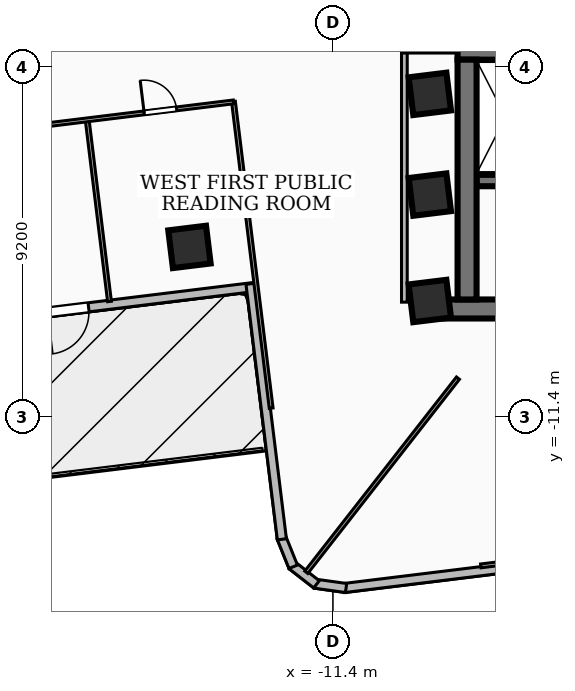
"""IFC4 building model, lengths in metres.
Left out: names, types, materials, properties, quantities, classifications, styles, units other than length and angle.
Written with IfcOpenShell. Run it as: python <this file> out.ifc"""

import sys

from ifc_helpers import new_model, si_unit, direction, frame, frame_2d, origin, origin_2d, place, context, subcontext, project, spatial, rectangle, extrude, element, fill, save


model = new_model("IFC4")
c1 = context("Model", 3, precision=1e-05, world=origin(), true_north=direction((0.0, 1.0)))
c2 = subcontext(c1, "Body", "Model", "MODEL_VIEW")
j1 = project(units=[si_unit("LENGTHUNIT", "METRE"), si_unit("PLANEANGLEUNIT", "RADIAN")], contexts=[c1])
p1 = place(None, origin())
s1 = spatial("IfcSite", under=j1, at=p1, CompositionType="ELEMENT")
p2 = place(p1, origin())
s2 = spatial("IfcBuilding", under=s1, at=p2, CompositionType="ELEMENT")
p3 = place(p2, frame((0.0, 0.0, 78.48)))
s3 = spatial("IfcBuildingStorey", under=s2, at=p3, CompositionType="ELEMENT", Elevation=78.48)
p4 = place(p3, frame((8.78, -8.56, 0.0), z_axis=(0.0, 0.0, 1.0), x_axis=(-1.0, 0.0, 0.0)))
e1 = element("IfcWall", 1, at=p4, inside=s3, PredefinedType="SHEAR", context=c2, shape_type="SweptSolid", body=[
    extrude(rectangle(XDim=17.56, YDim=0.5, at=frame_2d((8.78, 0.0))), origin(), (0.0, 0.0, 1.0), 3.34),
])
p5 = place(p3, frame((-8.12, -1.75, 0.0), z_axis=(0.0, 0.0, 1.0), x_axis=(1.0, 0.0, 0.0)))
e2 = element("IfcWall", 2, at=p5, inside=s3, PredefinedType="SHEAR", context=c2, shape_type="SweptSolid", body=[
    extrude(rectangle(XDim=16.24, YDim=0.5, at=frame_2d((8.12, 0.0))), origin(), (0.0, 0.0, 1.0), 3.34),
])
p6 = place(p5, frame((7.45, 0.0, 0.0)))
e3 = element("IfcOpeningElement", 3, at=p6, cuts=e2, PredefinedType="OPENING", context=c2, shape_type="SweptSolid", body=[
    extrude(rectangle(XDim=1.0, YDim=2.1, at=frame_2d((0.5, 1.05))), frame((0.0, 0.26, 0.0), z_axis=(0.0, -1.0, 0.0), x_axis=(1.0, 0.0, 0.0)), (0.0, 0.0, 1.0), 0.52),
])
p7 = place(p5, frame((10.965, 0.0, 0.0)))
e4 = element("IfcOpeningElement", 4, at=p7, cuts=e2, PredefinedType="OPENING", context=c2, shape_type="SweptSolid", body=[
    extrude(rectangle(XDim=1.05, YDim=2.15, at=frame_2d((0.525, 1.075))), frame((0.0, 0.26, 0.0), z_axis=(0.0, -1.0, 0.0), x_axis=(1.0, 0.0, 0.0)), (0.0, 0.0, 1.0), 0.52),
])
p8 = place(p5, frame((12.525, 0.0, 0.0)))
e5 = element("IfcOpeningElement", 5, at=p8, cuts=e2, PredefinedType="OPENING", context=c2, shape_type="SweptSolid", body=[
    extrude(rectangle(XDim=1.05, YDim=2.15, at=frame_2d((0.525, 1.075))), frame((0.0, 0.26, 0.0), z_axis=(0.0, -1.0, 0.0), x_axis=(1.0, 0.0, 0.0)), (0.0, 0.0, 1.0), 0.52),
])
p9 = place(p5, frame((14.085, 0.0, 0.0)))
e6 = element("IfcOpeningElement", 6, at=p9, cuts=e2, PredefinedType="OPENING", context=c2, shape_type="SweptSolid", body=[
    extrude(rectangle(XDim=1.05, YDim=2.15, at=frame_2d((0.525, 1.075))), frame((0.0, 0.26, 0.0), z_axis=(0.0, -1.0, 0.0), x_axis=(1.0, 0.0, 0.0)), (0.0, 0.0, 1.0), 0.52),
])
p10 = place(p3, frame((-7.87, -8.31, 0.0), z_axis=(0.0, 0.0, 1.0), x_axis=(0.0, 1.0, 0.0)))
e7 = element("IfcWall", 7, at=p10, inside=s3, PredefinedType="SHEAR", context=c2, shape_type="SweptSolid", body=[
    extrude(rectangle(XDim=6.31, YDim=0.5, at=frame_2d((3.155, 0.0))), origin(), (0.0, 0.0, 1.0), 3.34),
])
p11 = place(p3, frame((-7.62, -5.18, 0.0), z_axis=(0.0, 0.0, 1.0), x_axis=(1.0, 0.0, 0.0)))
e8 = element("IfcWall", 8, at=p11, inside=s3, PredefinedType="SOLIDWALL", context=c2, shape_type="SweptSolid", body=[
    extrude(rectangle(XDim=15.24, YDim=0.3, at=frame_2d((7.62, 0.0))), origin(), (0.0, 0.0, 1.0), 3.34),
])
p12 = place(p11, frame((5.77, 0.0, 0.0)))
e9 = element("IfcOpeningElement", 9, at=p12, cuts=e8, PredefinedType="OPENING", context=c2, shape_type="SweptSolid", body=[
    extrude(rectangle(XDim=1.1, YDim=2.15, at=frame_2d((0.55, 1.075))), frame((0.0, 0.16, 0.0), z_axis=(0.0, -1.0, 0.0), x_axis=(1.0, 0.0, 0.0)), (0.0, 0.0, 1.0), 0.32),
])
p13 = place(p11, frame((7.97, 0.0, 0.0)))
e10 = element("IfcOpeningElement", 10, at=p13, cuts=e8, PredefinedType="OPENING", context=c2, shape_type="SweptSolid", body=[
    extrude(rectangle(XDim=1.0, YDim=2.1, at=frame_2d((0.5, 1.05))), frame((0.0, 0.16, 0.0), z_axis=(0.0, -1.0, 0.0), x_axis=(1.0, 0.0, 0.0)), (0.0, 0.0, 1.0), 0.32),
])
for number, where, z_axis, x_axis in (
    (11, (-8.85, -5.55, 0.0), (0.0, 0.0, 1.0), (0.993, 0.122, 0.0)),
    (12, (-8.85, -2.9, 0.0), (0.0, 0.0, 1.0), (0.993, 0.122, 0.0)),
    (13, (-8.85, -8.35, 0.0), (0.0, 0.0, 1.0), (0.993, 0.122, 0.0)),
    (14, (-15.175, -6.927, 0.0), (0.0, 0.0, 1.0), (0.993, 0.122, 0.0)),
):
    element("IfcColumn", number, at=place(p3, frame(where, z_axis=z_axis, x_axis=x_axis)), inside=s3, PredefinedType="COLUMN", context=c2, shape_type="SweptSolid", body=[
        extrude(rectangle(XDim=1.0, YDim=1.0, at=origin_2d()), origin(), (0.0, 0.0, 1.0), 3.6),
    ])
p14 = place(p3, frame((-13.462, -7.98, 0.0), z_axis=(0.0, 0.0, 1.0), x_axis=(-0.992550299081, -0.121835560463, 0.0)))
e15 = element("IfcWall", 15, at=p14, inside=s3, PredefinedType="SOLIDWALL", context=c2, shape_type="SweptSolid", body=[
    extrude(rectangle(XDim=16.275, YDim=0.24, at=frame_2d((8.138, 0.0))), origin(), (0.0, 0.0, 1.0), 2.644),
])
p15 = place(p14, frame((4.4, 0.0, 0.0)))
e16 = element("IfcOpeningElement", 16, at=p15, cuts=e15, PredefinedType="OPENING", context=c2, shape_type="SweptSolid", body=[
    extrude(rectangle(XDim=1.1, YDim=2.1, at=frame_2d((0.55, 1.05))), frame((0.0, 0.13, 0.0), z_axis=(0.0, -1.0, 0.0), x_axis=(1.0, 0.0, 0.0)), (0.0, 0.0, 1.0), 0.26),
])
p16 = place(p3, frame((-4.558, -15.098, 0.0), z_axis=(0.0, 0.0, 1.0), x_axis=(-0.992537639855, -0.121938646341, 0.0)))
e17 = element("IfcWall", 17, at=p16, inside=s3, PredefinedType="SOLIDWALL", context=c2, shape_type="SweptSolid", body=[
    extrude(rectangle(XDim=6.595, YDim=0.24, at=frame_2d((3.298, 0.0))), origin(), (0.0, 0.0, 1.0), 2.486),
])
p17 = place(p3, frame((-11.054, -15.902, 0.0), z_axis=(0.0, 0.0, 1.0), x_axis=(-0.990379629694, 0.138376981782, 0.0)))
e18 = element("IfcWall", 18, at=p17, inside=s3, PredefinedType="SOLIDWALL", context=c2, shape_type="SweptSolid", body=[
    extrude(rectangle(XDim=0.831, YDim=0.24, at=frame_2d((0.416, 0.0))), origin(), (0.0, 0.0, 1.0), 3.34),
])
p18 = place(p3, frame((-11.832, -15.805, 0.0), z_axis=(0.0, 0.0, 1.0), x_axis=(-0.788996702001, 0.614397431824, 0.0)))
e19 = element("IfcWall", 19, at=p18, inside=s3, PredefinedType="SOLIDWALL", context=c2, shape_type="SweptSolid", body=[
    extrude(rectangle(XDim=0.814, YDim=0.24, at=frame_2d((0.407, 0.0))), origin(), (0.0, 0.0, 1.0), 3.34),
])
p19 = place(p3, frame((-12.445, -15.343, 0.0), z_axis=(0.0, 0.0, 1.0), x_axis=(-0.37326634174, 0.927724225254, 0.0)))
e20 = element("IfcWall", 20, at=p19, inside=s3, PredefinedType="SOLIDWALL", context=c2, shape_type="SweptSolid", body=[
    extrude(rectangle(XDim=0.83, YDim=0.24, at=frame_2d((0.415, 0.0))), origin(), (0.0, 0.0, 1.0), 3.34),
])
p20 = place(p3, frame((-12.743, -14.621, 0.0), z_axis=(0.0, 0.0, 1.0), x_axis=(-0.121949848087, 0.992536263595, 0.0)))
e21 = element("IfcWall", 21, at=p20, inside=s3, PredefinedType="SOLIDWALL", context=c2, shape_type="SweptSolid", body=[
    extrude(rectangle(XDim=6.775, YDim=0.24, at=frame_2d((3.387, 0.0))), origin(), (0.0, 0.0, 1.0), 2.644),
])
p21 = place(p3, frame((-9.52, -8.38, 0.0), z_axis=(0.0, 0.0, 1.0), x_axis=(0.0, 1.0, 0.0)))
e22 = element("IfcWall", 22, at=p21, inside=s3, PredefinedType="PARTITIONING", context=c2, shape_type="SweptSolid", body=[
    extrude(rectangle(XDim=6.63, YDim=0.15, at=frame_2d((3.315, 0.0))), origin(), (0.0, 0.0, 1.0), 2.486),
])
p22 = place(p3, frame((-7.85, -1.75, 0.0), z_axis=(0.0, 0.0, 1.0), x_axis=(-1.0, 0.0, 0.0)))
e23 = element("IfcWall", 23, at=p22, inside=s3, PredefinedType="PARTITIONING", context=c2, shape_type="SweptSolid", body=[
    extrude(rectangle(XDim=1.67, YDim=0.15, at=frame_2d((0.835, 0.0))), origin(), (0.0, 0.0, 1.0), 2.405),
])
p23 = place(p3, frame((-8.11, -10.38, 0.0), z_axis=(0.0, 0.0, 1.0), x_axis=(-0.615665236773, -0.788007814828, 0.0)))
e24 = element("IfcWall", 24, at=p23, inside=s3, PredefinedType="PARTITIONING", context=c2, shape_type="SweptSolid", body=[
    extrude(rectangle(XDim=6.482, YDim=0.1, at=frame_2d((3.241, 0.0))), origin(), (0.0, 0.0, 1.0), 2.644),
])
p24 = place(p3, frame((-14.017, -3.101, 0.0), z_axis=(0.0, 0.0, 1.0), x_axis=(0.122045971517, -0.992524448483, 0.0)))
e25 = element("IfcWall", 25, at=p24, inside=s3, PredefinedType="PARTITIONING", context=c2, shape_type="SweptSolid", body=[
    extrude(rectangle(XDim=8.13, YDim=0.1, at=frame_2d((4.065, 0.0))), origin(), (0.0, 0.0, 1.0), 2.486),
])
p25 = place(p3, frame((-17.864, -3.604, 0.0), z_axis=(0.0, 0.0, 1.0), x_axis=(0.121997782455, -0.992530372873, 0.0)))
e26 = element("IfcWall", 26, at=p25, inside=s3, PredefinedType="PARTITIONING", context=c2, shape_type="SweptSolid", body=[
    extrude(rectangle(XDim=4.795, YDim=0.1, at=frame_2d((2.397, 0.0))), origin(), (0.0, 0.0, 1.0), 2.486),
])
p26 = place(p3, frame((-20.775, -3.941, 0.0), z_axis=(0.0, 0.0, 1.0), x_axis=(0.992549540745, 0.121841738199, 0.0)))
e27 = element("IfcWall", 27, at=p26, inside=s3, PredefinedType="PARTITIONING", context=c2, shape_type="SweptSolid", body=[
    extrude(rectangle(XDim=6.811, YDim=0.1, at=frame_2d((3.405, 0.0))), origin(), (0.0, 0.0, 1.0), 3.34),
])
p27 = place(p26, frame((4.441, 0.0, 0.0)))
e28 = element("IfcOpeningElement", 28, at=p27, cuts=e27, PredefinedType="OPENING", context=c2, shape_type="SweptSolid", body=[
    extrude(rectangle(XDim=0.86, YDim=2.04, at=frame_2d((0.43, 1.02))), frame((0.0, 0.06, 0.0), z_axis=(0.0, -1.0, 0.0), x_axis=(1.0, 0.0, 0.0)), (0.0, 0.0, 1.0), 0.12),
])
p28 = place(p26, frame((1.036, 0.0, 0.0)))
e29 = element("IfcOpeningElement", 29, at=p28, cuts=e27, PredefinedType="OPENING", context=c2, shape_type="SweptSolid", body=[
    extrude(rectangle(XDim=0.86, YDim=2.04, at=frame_2d((0.43, 1.02))), frame((0.0, 0.06, 0.0), z_axis=(0.0, -1.0, 0.0), x_axis=(1.0, 0.0, 0.0)), (0.0, 0.0, 1.0), 0.12),
])
p29 = place(p3, frame((-7.509, -15.32, 0.0), z_axis=(0.0, 0.0, 1.0), x_axis=(0.992529957607, 0.122001160868, 0.0)))
e30 = element("IfcWall", 30, at=p29, inside=s3, PredefinedType="PARTITIONING", context=c2, shape_type="SweptSolid", body=[
    extrude(rectangle(XDim=7.95, YDim=0.1, at=frame_2d((3.975, 0.0))), origin(), (0.0, 0.0, 1.0), 2.486),
])
p30 = place(p15, origin())
e31 = element("IfcDoor", 31, at=p30, inside=s3, OperationType="SINGLE_SWING_RIGHT", PredefinedType="DOOR", context=c2, shape_type="SweptSolid", body=[
    extrude(rectangle(XDim=1.1, YDim=2.1, at=frame_2d((0.55, 1.05))), frame((0.0, 0.025, 0.0), z_axis=(0.0, -1.0, 0.0), x_axis=(1.0, 0.0, 0.0)), (0.0, 0.0, 1.0), 0.05),
])
fill(e16, e31)
p31 = place(p27, origin())
e32 = element("IfcDoor", 32, at=p31, inside=s3, OperationType="SINGLE_SWING_LEFT", PredefinedType="DOOR", context=c2, shape_type="SweptSolid", body=[
    extrude(rectangle(XDim=0.86, YDim=2.04, at=frame_2d((0.43, 1.02))), frame((0.0, 0.025, 0.0), z_axis=(0.0, -1.0, 0.0), x_axis=(1.0, 0.0, 0.0)), (0.0, 0.0, 1.0), 0.05),
])
fill(e28, e32)
save(model, sys.argv[1])
